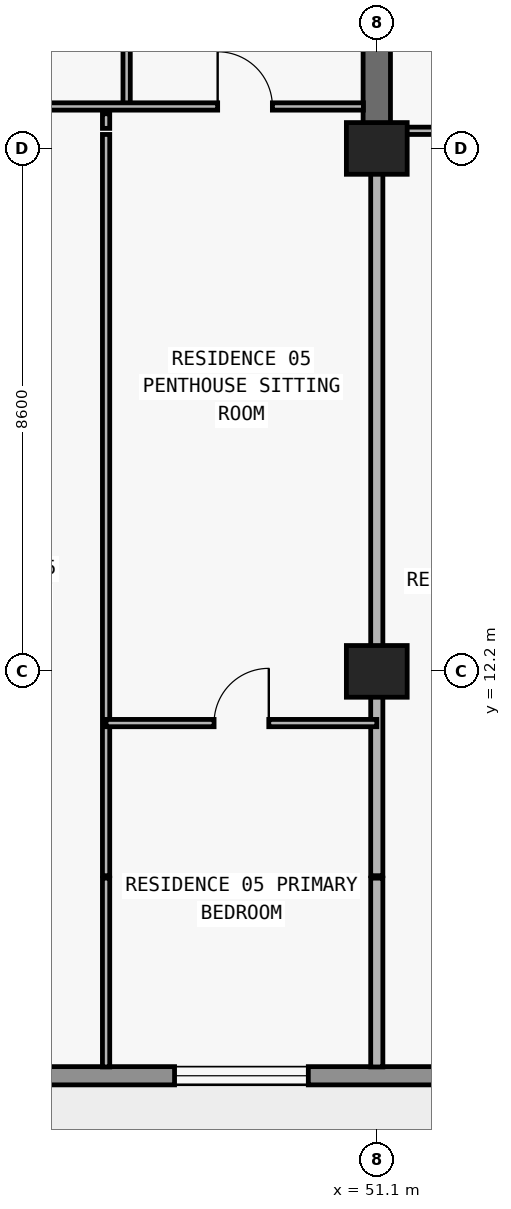
"""IFC4 building model, lengths in metres.
Left out: names, types, materials, properties, quantities, classifications, styles, units other than length and angle.
Written with IfcOpenShell. Run it as: python <this file> out.ifc"""

import sys

from ifc_helpers import new_model, si_unit, direction, frame, frame_2d, origin, origin_2d, place, context, subcontext, project, spatial, rectangle, extrude, element, fill, save


model = new_model("IFC4")
c1 = context("Model", 3, precision=1e-05, world=origin(), true_north=direction((0.0, 1.0)))
c2 = subcontext(c1, "Body", "Model", "MODEL_VIEW")
j1 = project(units=[si_unit("LENGTHUNIT", "METRE"), si_unit("PLANEANGLEUNIT", "RADIAN")], contexts=[c1])
p1 = place(None, origin())
s1 = spatial("IfcSite", under=j1, at=p1, CompositionType="ELEMENT")
p2 = place(p1, origin())
s2 = spatial("IfcBuilding", under=s1, at=p2, CompositionType="ELEMENT")
p3 = place(p2, frame((0.0, 0.0, 122.4)))
s3 = spatial("IfcBuildingStorey", under=s2, at=p3, CompositionType="ELEMENT", Elevation=122.4)
for number, where, z_axis, x_axis in (
    (1, (51.1, 12.2, 0.0), (0.0, 0.0, 1.0), (1.0, 0.0, 0.0)),
    (2, (51.1, 20.8, 0.0), (0.0, 0.0, 1.0), (1.0, 0.0, 0.0)),
):
    element("IfcColumn", number, at=place(p3, frame(where, z_axis=z_axis, x_axis=x_axis)), inside=s3, PredefinedType="COLUMN", context=c2, shape_type="SweptSolid", body=[
        extrude(rectangle(XDim=1.0, YDim=0.85, at=origin_2d()), origin(), (0.0, 0.0, 1.0), 3.05),
    ])
p4 = place(p3, frame((51.1, 20.8, 0.0), z_axis=(0.0, 0.0, 1.0), x_axis=(0.0, 1.0, 0.0)))
e3 = element("IfcWall", 3, at=p4, inside=s3, PredefinedType="SHEAR", context=c2, shape_type="SweptSolid", body=[
    extrude(rectangle(XDim=8.6, YDim=0.45, at=frame_2d((4.3, 0.0))), origin(), (0.0, 0.0, 1.0), 3.05),
])
p5 = place(p3, frame((70.1, 5.55, 0.0), z_axis=(0.0, 0.0, 1.0), x_axis=(-1.0, 0.0, 0.0)))
e4 = element("IfcWall", 4, at=p5, inside=s3, PredefinedType="STANDARD", context=c2, shape_type="SweptSolid", body=[
    extrude(rectangle(XDim=62.4, YDim=0.3, at=frame_2d((31.2, 0.0))), origin(), (0.0, 0.0, 1.0), 3.05),
])
p6 = place(p5, frame((57.226, 0.0, 0.0)))
e5 = element("IfcOpeningElement", 5, at=p6, cuts=e4, PredefinedType="OPENING", context=c2, shape_type="SweptSolid", body=[
    extrude(rectangle(XDim=2.0, YDim=2.3, at=frame_2d((1.0, 1.15))), frame((0.0, 0.16, 0.0), z_axis=(0.0, -1.0, 0.0), x_axis=(1.0, 0.0, 0.0)), (0.0, 0.0, 1.0), 0.32),
])
p7 = place(p5, frame((52.926, 0.0, 0.85)))
e6 = element("IfcOpeningElement", 6, at=p7, cuts=e4, PredefinedType="OPENING", context=c2, shape_type="SweptSolid", body=[
    extrude(rectangle(XDim=2.2, YDim=1.55, at=frame_2d((1.1, 0.775))), frame((0.0, 0.16, 0.0), z_axis=(0.0, -1.0, 0.0), x_axis=(1.0, 0.0, 0.0)), (0.0, 0.0, 1.0), 0.32),
])
p8 = place(p5, frame((48.49, 0.0, 0.0)))
e7 = element("IfcOpeningElement", 7, at=p8, cuts=e4, PredefinedType="OPENING", context=c2, shape_type="SweptSolid", body=[
    extrude(rectangle(XDim=2.0, YDim=2.3, at=frame_2d((1.0, 1.15))), frame((0.0, 0.16, 0.0), z_axis=(0.0, -1.0, 0.0), x_axis=(1.0, 0.0, 0.0)), (0.0, 0.0, 1.0), 0.32),
])
p9 = place(p5, frame((44.39, 0.0, 0.85)))
e8 = element("IfcOpeningElement", 8, at=p9, cuts=e4, PredefinedType="OPENING", context=c2, shape_type="SweptSolid", body=[
    extrude(rectangle(XDim=1.8, YDim=1.55, at=frame_2d((0.9, 0.775))), frame((0.0, 0.16, 0.0), z_axis=(0.0, -1.0, 0.0), x_axis=(1.0, 0.0, 0.0)), (0.0, 0.0, 1.0), 0.32),
])
p10 = place(p5, frame((40.426, 0.0, 0.0)))
e9 = element("IfcOpeningElement", 9, at=p10, cuts=e4, PredefinedType="OPENING", context=c2, shape_type="SweptSolid", body=[
    extrude(rectangle(XDim=2.0, YDim=2.3, at=frame_2d((1.0, 1.15))), frame((0.0, 0.16, 0.0), z_axis=(0.0, -1.0, 0.0), x_axis=(1.0, 0.0, 0.0)), (0.0, 0.0, 1.0), 0.32),
])
p11 = place(p5, frame((36.126, 0.0, 0.85)))
e10 = element("IfcOpeningElement", 10, at=p11, cuts=e4, PredefinedType="OPENING", context=c2, shape_type="SweptSolid", body=[
    extrude(rectangle(XDim=2.2, YDim=1.55, at=frame_2d((1.1, 0.775))), frame((0.0, 0.16, 0.0), z_axis=(0.0, -1.0, 0.0), x_axis=(1.0, 0.0, 0.0)), (0.0, 0.0, 1.0), 0.32),
])
p12 = place(p5, frame((31.91, 0.0, 0.0)))
e11 = element("IfcOpeningElement", 11, at=p12, cuts=e4, PredefinedType="OPENING", context=c2, shape_type="SweptSolid", body=[
    extrude(rectangle(XDim=2.0, YDim=2.3, at=frame_2d((1.0, 1.15))), frame((0.0, 0.16, 0.0), z_axis=(0.0, -1.0, 0.0), x_axis=(1.0, 0.0, 0.0)), (0.0, 0.0, 1.0), 0.32),
])
p13 = place(p5, frame((28.21, 0.0, 0.85)))
e12 = element("IfcOpeningElement", 12, at=p13, cuts=e4, PredefinedType="OPENING", context=c2, shape_type="SweptSolid", body=[
    extrude(rectangle(XDim=1.8, YDim=1.55, at=frame_2d((0.9, 0.775))), frame((0.0, 0.16, 0.0), z_axis=(0.0, -1.0, 0.0), x_axis=(1.0, 0.0, 0.0)), (0.0, 0.0, 1.0), 0.32),
])
p14 = place(p5, frame((24.426, 0.0, 0.0)))
e13 = element("IfcOpeningElement", 13, at=p14, cuts=e4, PredefinedType="OPENING", context=c2, shape_type="SweptSolid", body=[
    extrude(rectangle(XDim=2.0, YDim=2.3, at=frame_2d((1.0, 1.15))), frame((0.0, 0.16, 0.0), z_axis=(0.0, -1.0, 0.0), x_axis=(1.0, 0.0, 0.0)), (0.0, 0.0, 1.0), 0.32),
])
p15 = place(p5, frame((20.126, 0.0, 0.85)))
e14 = element("IfcOpeningElement", 14, at=p15, cuts=e4, PredefinedType="OPENING", context=c2, shape_type="SweptSolid", body=[
    extrude(rectangle(XDim=2.2, YDim=1.55, at=frame_2d((1.1, 0.775))), frame((0.0, 0.16, 0.0), z_axis=(0.0, -1.0, 0.0), x_axis=(1.0, 0.0, 0.0)), (0.0, 0.0, 1.0), 0.32),
])
p16 = place(p5, frame((15.69, 0.0, 0.0)))
e15 = element("IfcOpeningElement", 15, at=p16, cuts=e4, PredefinedType="OPENING", context=c2, shape_type="SweptSolid", body=[
    extrude(rectangle(XDim=2.0, YDim=2.3, at=frame_2d((1.0, 1.15))), frame((0.0, 0.16, 0.0), z_axis=(0.0, -1.0, 0.0), x_axis=(1.0, 0.0, 0.0)), (0.0, 0.0, 1.0), 0.32),
])
p17 = place(p5, frame((11.59, 0.0, 0.85)))
e16 = element("IfcOpeningElement", 16, at=p17, cuts=e4, PredefinedType="OPENING", context=c2, shape_type="SweptSolid", body=[
    extrude(rectangle(XDim=1.8, YDim=1.55, at=frame_2d((0.9, 0.775))), frame((0.0, 0.16, 0.0), z_axis=(0.0, -1.0, 0.0), x_axis=(1.0, 0.0, 0.0)), (0.0, 0.0, 1.0), 0.32),
])
p18 = place(p5, frame((7.626, 0.0, 0.0)))
e17 = element("IfcOpeningElement", 17, at=p18, cuts=e4, PredefinedType="OPENING", context=c2, shape_type="SweptSolid", body=[
    extrude(rectangle(XDim=2.0, YDim=2.3, at=frame_2d((1.0, 1.15))), frame((0.0, 0.16, 0.0), z_axis=(0.0, -1.0, 0.0), x_axis=(1.0, 0.0, 0.0)), (0.0, 0.0, 1.0), 0.32),
])
p19 = place(p5, frame((3.326, 0.0, 0.85)))
e18 = element("IfcOpeningElement", 18, at=p19, cuts=e4, PredefinedType="OPENING", context=c2, shape_type="SweptSolid", body=[
    extrude(rectangle(XDim=2.2, YDim=1.55, at=frame_2d((1.1, 0.775))), frame((0.0, 0.16, 0.0), z_axis=(0.0, -1.0, 0.0), x_axis=(1.0, 0.0, 0.0)), (0.0, 0.0, 1.0), 0.32),
])
p20 = place(p3, frame((46.648, 5.695, 0.0), z_axis=(0.0, 0.0, 1.0), x_axis=(0.0, 1.0, 0.0)))
e19 = element("IfcWall", 19, at=p20, inside=s3, PredefinedType="PARTITIONING", context=c2, shape_type="SweptSolid", body=[
    extrude(rectangle(XDim=3.105, YDim=0.12, at=frame_2d((1.552, 0.0))), origin(), (0.0, 0.0, 1.0), 3.05),
])
p21 = place(p3, frame((46.648, 8.84, 0.0), z_axis=(0.0, 0.0, 1.0), x_axis=(0.0, 1.0, 0.0)))
e20 = element("IfcWall", 20, at=p21, inside=s3, PredefinedType="PARTITIONING", context=c2, shape_type="SweptSolid", body=[
    extrude(rectangle(XDim=12.19, YDim=0.12, at=frame_2d((6.095, 0.0))), origin(), (0.0, 0.0, 1.0), 3.05),
])
p22 = place(p3, frame((46.648, 21.13, 0.0), z_axis=(0.0, 0.0, 1.0), x_axis=(0.0, 1.0, 0.0)))
e21 = element("IfcWall", 21, at=p22, inside=s3, PredefinedType="PARTITIONING", context=c2, shape_type="SweptSolid", body=[
    extrude(rectangle(XDim=0.24, YDim=0.12, at=frame_2d((0.12, 0.0))), origin(), (0.0, 0.0, 1.0), 3.05),
])
p23 = place(p3, frame((46.986, 21.49, 0.0), z_axis=(0.0, 0.0, 1.0), x_axis=(0.0, 1.0, 0.0)))
e22 = element("IfcWall", 22, at=p23, inside=s3, PredefinedType="PARTITIONING", context=c2, shape_type="SweptSolid", body=[
    extrude(rectangle(XDim=4.69, YDim=0.12, at=frame_2d((2.345, 0.0))), origin(), (0.0, 0.0, 1.0), 2.486),
])
p24 = place(p23, frame((1.895, 0.0, 0.0)))
e23 = element("IfcOpeningElement", 23, at=p24, cuts=e22, PredefinedType="OPENING", context=c2, shape_type="SweptSolid", body=[
    extrude(rectangle(XDim=0.9, YDim=2.15, at=frame_2d((0.45, 1.075))), frame((0.0, 0.07, 0.0), z_axis=(0.0, -1.0, 0.0), x_axis=(1.0, 0.0, 0.0)), (0.0, 0.0, 1.0), 0.14),
])
p25 = place(p3, frame((51.1, 5.695, 0.0), z_axis=(0.0, 0.0, 1.0), x_axis=(0.0, 1.0, 0.0)))
e24 = element("IfcWall", 24, at=p25, inside=s3, PredefinedType="PARTITIONING", context=c2, shape_type="SweptSolid", body=[
    extrude(rectangle(XDim=3.105, YDim=0.2, at=frame_2d((1.552, 0.0))), origin(), (0.0, 0.0, 1.0), 3.05),
])
p26 = place(p3, frame((51.1, 8.84, 0.0), z_axis=(0.0, 0.0, 1.0), x_axis=(0.0, 1.0, 0.0)))
e25 = element("IfcWall", 25, at=p26, inside=s3, PredefinedType="PARTITIONING", context=c2, shape_type="SweptSolid", body=[
    extrude(rectangle(XDim=11.955, YDim=0.2, at=frame_2d((5.978, 0.0))), origin(), (0.0, 0.0, 1.0), 2.174),
])
p27 = place(p3, frame((46.648, 11.35, 0.0), z_axis=(0.0, 0.0, 1.0), x_axis=(1.0, 0.0, 0.0)))
e26 = element("IfcWall", 26, at=p27, inside=s3, PredefinedType="PARTITIONING", context=c2, shape_type="SweptSolid", body=[
    extrude(rectangle(XDim=4.452, YDim=0.12, at=frame_2d((2.226, 0.0))), origin(), (0.0, 0.0, 1.0), 3.05),
])
p28 = place(p27, frame((1.776, 0.0, 0.0)))
e27 = element("IfcOpeningElement", 27, at=p28, cuts=e26, PredefinedType="OPENING", context=c2, shape_type="SweptSolid", body=[
    extrude(rectangle(XDim=0.9, YDim=2.15, at=frame_2d((0.45, 1.075))), frame((0.0, 0.07, 0.0), z_axis=(0.0, -1.0, 0.0), x_axis=(1.0, 0.0, 0.0)), (0.0, 0.0, 1.0), 0.14),
])
p29 = place(p3, frame((51.32, 21.09, 0.0), z_axis=(0.0, 0.0, 1.0), x_axis=(1.0, 0.0, 0.0)))
e28 = element("IfcWall", 28, at=p29, inside=s3, PredefinedType="PARTITIONING", context=c2, shape_type="SweptSolid", body=[
    extrude(rectangle(XDim=8.18, YDim=0.12, at=frame_2d((4.09, 0.0))), origin(), (0.0, 0.0, 1.0), 2.174),
])
p30 = place(p29, frame((1.708, 0.0, 0.0)))
e29 = element("IfcOpeningElement", 29, at=p30, cuts=e28, PredefinedType="OPENING", context=c2, shape_type="SweptSolid", body=[
    extrude(rectangle(XDim=0.9, YDim=2.124, at=frame_2d((0.45, 1.062))), frame((0.0, 0.07, 0.0), z_axis=(0.0, -1.0, 0.0), x_axis=(1.0, 0.0, 0.0)), (0.0, 0.0, 1.0), 0.14),
])
p31 = place(p29, frame((5.84, 0.0, 0.0)))
e30 = element("IfcOpeningElement", 30, at=p31, cuts=e28, PredefinedType="OPENING", context=c2, shape_type="SweptSolid", body=[
    extrude(rectangle(XDim=0.9, YDim=2.124, at=frame_2d((0.45, 1.062))), frame((0.0, 0.07, 0.0), z_axis=(0.0, -1.0, 0.0), x_axis=(1.0, 0.0, 0.0)), (0.0, 0.0, 1.0), 0.14),
])
p32 = place(p3, frame((42.7, 21.49, 0.0), z_axis=(0.0, 0.0, 1.0), x_axis=(1.0, 0.0, 0.0)))
e31 = element("IfcWall", 31, at=p32, inside=s3, PredefinedType="PARTITIONING", context=c2, shape_type="SweptSolid", body=[
    extrude(rectangle(XDim=8.18, YDim=0.12, at=frame_2d((4.09, 0.0))), origin(), (0.0, 0.0, 1.0), 3.05),
])
p33 = place(p32, frame((1.524, 0.0, 0.0)))
e32 = element("IfcOpeningElement", 32, at=p33, cuts=e31, PredefinedType="OPENING", context=c2, shape_type="SweptSolid", body=[
    extrude(rectangle(XDim=0.9, YDim=2.15, at=frame_2d((0.45, 1.075))), frame((0.0, 0.07, 0.0), z_axis=(0.0, -1.0, 0.0), x_axis=(1.0, 0.0, 0.0)), (0.0, 0.0, 1.0), 0.14),
])
p34 = place(p32, frame((5.783, 0.0, 0.0)))
e33 = element("IfcOpeningElement", 33, at=p34, cuts=e31, PredefinedType="OPENING", context=c2, shape_type="SweptSolid", body=[
    extrude(rectangle(XDim=0.9, YDim=2.15, at=frame_2d((0.45, 1.075))), frame((0.0, 0.07, 0.0), z_axis=(0.0, -1.0, 0.0), x_axis=(1.0, 0.0, 0.0)), (0.0, 0.0, 1.0), 0.14),
])
p35 = place(p15, origin())
e34 = element("IfcWindow", 34, at=p35, inside=s3, PartitioningType="SINGLE_PANEL", PredefinedType="WINDOW", context=c2, shape_type="SweptSolid", body=[
    extrude(rectangle(XDim=2.2, YDim=1.55, at=frame_2d((1.1, 0.775))), frame((0.0, 0.03, 0.0), z_axis=(0.0, -1.0, 0.0), x_axis=(1.0, 0.0, 0.0)), (0.0, 0.0, 1.0), 0.06),
])
fill(e14, e34)
p36 = place(p34, origin())
e35 = element("IfcDoor", 35, at=p36, inside=s3, OperationType="SINGLE_SWING_LEFT", PredefinedType="DOOR", context=c2, shape_type="SweptSolid", body=[
    extrude(rectangle(XDim=0.9, YDim=2.15, at=frame_2d((0.45, 1.075))), frame((0.0, 0.025, 0.0), z_axis=(0.0, -1.0, 0.0), x_axis=(1.0, 0.0, 0.0)), (0.0, 0.0, 1.0), 0.05),
])
fill(e33, e35)
p37 = place(p28, origin())
e36 = element("IfcDoor", 36, at=p37, inside=s3, OperationType="SINGLE_SWING_RIGHT", PredefinedType="DOOR", context=c2, shape_type="SweptSolid", body=[
    extrude(rectangle(XDim=0.9, YDim=2.15, at=frame_2d((0.45, 1.075))), frame((0.0, 0.025, 0.0), z_axis=(0.0, -1.0, 0.0), x_axis=(1.0, 0.0, 0.0)), (0.0, 0.0, 1.0), 0.05),
])
fill(e27, e36)
save(model, sys.argv[1])
